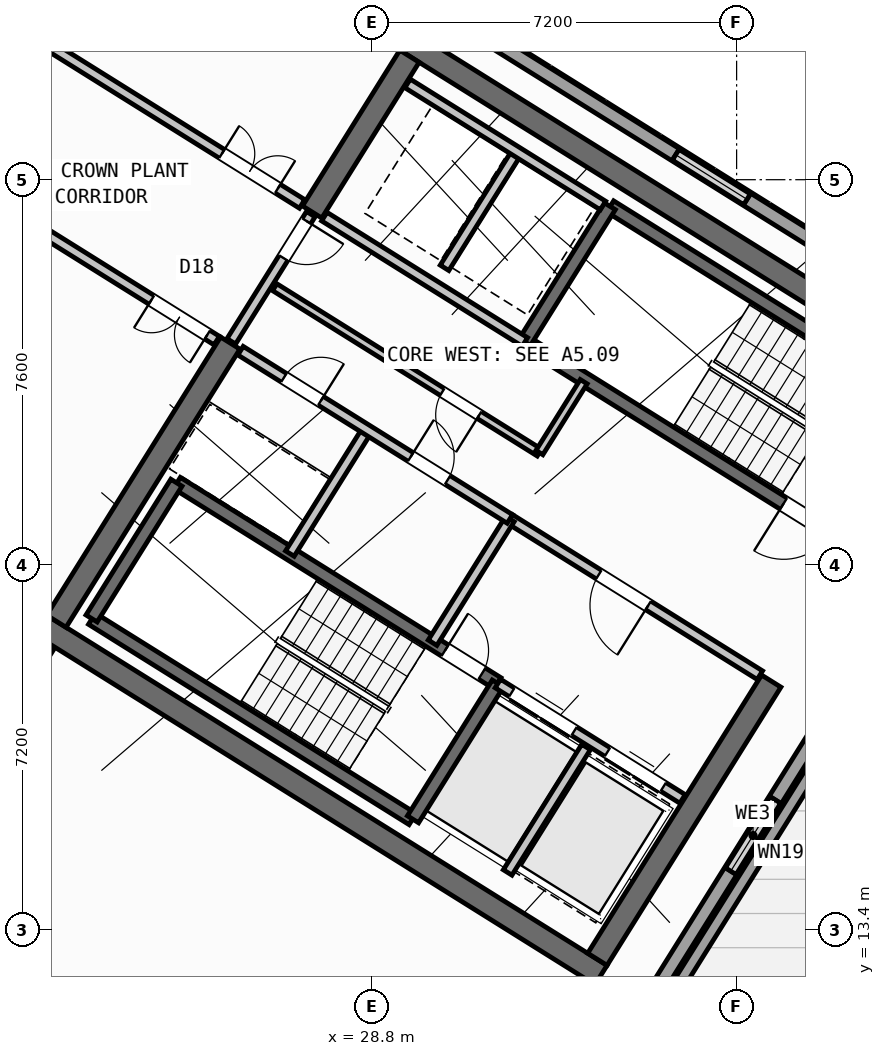
"""IFC4 building model, lengths in metres.
Left out: names, types, materials, properties, quantities, classifications, styles, units other than length and angle.
Written with IfcOpenShell. Run it as: python <this file> out.ifc"""

import sys

from ifc_helpers import new_model, si_unit, direction, frame, frame_2d, origin, origin_2d, place, context, subcontext, project, spatial, rectangle, hollow_rectangle, extrude, source, transform, mapped, element, fill, save


model = new_model("IFC4")
c1 = context("Model", 3, precision=1e-05, world=origin(), true_north=direction((0.0, 1.0)))
c2 = subcontext(c1, "Body", "Model", "MODEL_VIEW")
j1 = project(units=[si_unit("LENGTHUNIT", "METRE"), si_unit("PLANEANGLEUNIT", "RADIAN")], contexts=[c1])
p1 = place(None, origin())
s1 = spatial("IfcSite", under=j1, at=p1, CompositionType="ELEMENT")
p2 = place(p1, origin())
s2 = spatial("IfcBuilding", under=s1, at=p2, CompositionType="ELEMENT")
p3 = place(p2, frame((0.0, 0.0, 298.8)))
s3 = spatial("IfcBuildingStorey", under=s2, at=p3, CompositionType="ELEMENT", Elevation=298.8)
p4 = place(p3, frame((40.531, 24.036, 0.0), z_axis=(0.0, 0.0, 1.0), x_axis=(-0.848048787466, 0.529918157905, 0.0)))
e1 = element("IfcWall", 1, at=p4, inside=s3, PredefinedType="SHEAR", context=c2, shape_type="SweptSolid", body=[
    extrude(rectangle(XDim=13.04, YDim=0.45, at=frame_2d((6.52, 0.0))), origin(), (0.0, 0.0, 1.0), 3.32),
])
p5 = place(p3, frame((33.324, 12.503, 0.0), z_axis=(0.0, 0.0, 1.0), x_axis=(-0.848043529849, 0.529926571782, 0.0)))
e2 = element("IfcWall", 2, at=p5, inside=s3, PredefinedType="SHEAR", context=c2, shape_type="SweptSolid", body=[
    extrude(rectangle(XDim=13.04, YDim=0.45, at=frame_2d((6.52, 0.0))), origin(), (0.0, 0.0, 1.0), 3.32),
])
p6 = place(p3, frame((36.683, 18.304, 0.0), z_axis=(0.0, 0.0, 1.0), x_axis=(-0.529904039071, -0.848057609704, 0.0)))
e3 = element("IfcWall", 3, at=p6, inside=s3, PredefinedType="SHEAR", context=c2, shape_type="SweptSolid", body=[
    extrude(rectangle(XDim=6.475, YDim=0.45, at=frame_2d((3.238, 0.0))), origin(), (0.0, 0.0, 1.0), 3.32),
])
p7 = place(p3, frame((29.544, 30.636, 0.0), z_axis=(0.0, 0.0, 1.0), x_axis=(-0.529902075036, -0.848058836916, 0.0)))
e4 = element("IfcWall", 4, at=p7, inside=s3, PredefinedType="SHEAR", context=c2, shape_type="SweptSolid", body=[
    extrude(rectangle(XDim=3.625, YDim=0.45, at=frame_2d((1.812, 0.0))), origin(), (0.0, 0.0, 1.0), 3.32),
])
p8 = place(p3, frame((26.007, 24.976, 0.0), z_axis=(0.0, 0.0, 1.0), x_axis=(-0.529931155655, -0.848040665456, 0.0)))
e5 = element("IfcWall", 5, at=p8, inside=s3, PredefinedType="SHEAR", context=c2, shape_type="SweptSolid", body=[
    extrude(rectangle(XDim=6.475, YDim=0.45, at=frame_2d((3.238, 0.0))), origin(), (0.0, 0.0, 1.0), 3.32),
])
m1 = source(origin(), c2, "Body", "SweptSolid", [
    extrude(hollow_rectangle(XDim=0.5, YDim=0.5, WallThickness=0.025, at=origin_2d()), origin(), (0.0, 0.0, 1.0), 3.6),
])
p9 = place(p3, frame((22.191, 18.87, 0.0), z_axis=(0.0, 0.0, 1.0), x_axis=(-0.848048096156, 0.529919264233, 0.0)))
e6 = element("IfcColumn", 6, at=p9, inside=s3, PredefinedType="COLUMN", context=c2, shape_type="MappedRepresentation", body=[
    mapped(m1, transform((0.0, 0.0, 0.0), scale=1.0)),
])
p10 = place(p3, frame((31.994, 7.742, 0.0), z_axis=(0.0, 0.0, 1.0), x_axis=(0.529920903963, 0.848047071537, 0.0)))
e7 = element("IfcWall", 7, at=p10, inside=s3, PredefinedType="PARAPET", context=c2, shape_type="SweptSolid", body=[
    extrude(rectangle(XDim=17.436, YDim=0.24, at=frame_2d((8.718, 0.0))), origin(), (0.0, 0.0, 1.0), 1.15),
])
p11 = place(p3, frame((41.182, 23.031, 0.0), z_axis=(0.0, 0.0, 1.0), x_axis=(-0.529915150569, -0.848050666645, 0.0)))
e8 = element("IfcWall", 8, at=p11, inside=s3, PredefinedType="STANDARD", context=c2, shape_type="SweptSolid", body=[
    extrude(rectangle(XDim=18.334, YDim=0.28, at=frame_2d((9.167, 0.0))), origin(), (0.0, 0.0, 1.0), 3.32),
])
p12 = place(p11, frame((8.317, 0.0, 0.85)))
e9 = element("IfcOpeningElement", 9, at=p12, cuts=e8, PredefinedType="OPENING", context=c2, shape_type="SweptSolid", body=[
    extrude(rectangle(XDim=1.7, YDim=1.6, at=frame_2d((0.85, 0.8))), frame((0.0, 0.15, 0.0), z_axis=(0.0, -1.0, 0.0), x_axis=(1.0, 0.0, 0.0)), (0.0, 0.0, 1.0), 0.3),
])
p13 = place(p3, frame((29.512, 7.031, 0.0), z_axis=(0.0, 0.0, 1.0), x_axis=(-0.848049620433, 0.529916824873, 0.0)))
e10 = element("IfcWall", 10, at=p13, inside=s3, PredefinedType="STANDARD", context=c2, shape_type="SweptSolid", body=[
    extrude(rectangle(XDim=22.984, YDim=0.28, at=frame_2d((11.492, 0.0))), origin(), (0.0, 0.0, 1.0), 3.32),
])
p14 = place(p13, frame((8.283, 0.0, 0.85)))
e11 = element("IfcOpeningElement", 11, at=p14, cuts=e10, PredefinedType="OPENING", context=c2, shape_type="SweptSolid", body=[
    extrude(rectangle(XDim=1.7, YDim=1.6, at=frame_2d((0.85, 0.8))), frame((0.0, 0.15, 0.0), z_axis=(0.0, -1.0, 0.0), x_axis=(1.0, 0.0, 0.0)), (0.0, 0.0, 1.0), 0.3),
])
p15 = place(p13, frame((19.875, 0.0, 0.85)))
e12 = element("IfcOpeningElement", 12, at=p15, cuts=e10, PredefinedType="OPENING", context=c2, shape_type="SweptSolid", body=[
    extrude(rectangle(XDim=1.7, YDim=1.6, at=frame_2d((0.85, 0.8))), frame((0.0, 0.15, 0.0), z_axis=(0.0, -1.0, 0.0), x_axis=(1.0, 0.0, 0.0)), (0.0, 0.0, 1.0), 0.3),
])
p16 = place(p3, frame((21.239, 37.164, 0.0), z_axis=(0.0, 0.0, 1.0), x_axis=(0.848046637573, -0.529921598447, 0.0)))
e13 = element("IfcWall", 13, at=p16, inside=s3, PredefinedType="STANDARD", context=c2, shape_type="SweptSolid", body=[
    extrude(rectangle(XDim=22.984, YDim=0.28, at=frame_2d((11.492, 0.0))), origin(), (0.0, 0.0, 1.0), 3.32),
])
p17 = place(p16, frame((4.326, 0.0, 0.85)))
e14 = element("IfcOpeningElement", 14, at=p17, cuts=e13, PredefinedType="OPENING", context=c2, shape_type="SweptSolid", body=[
    extrude(rectangle(XDim=1.7, YDim=1.6, at=frame_2d((0.85, 0.8))), frame((0.0, 0.15, 0.0), z_axis=(0.0, -1.0, 0.0), x_axis=(1.0, 0.0, 0.0)), (0.0, 0.0, 1.0), 0.3),
])
p18 = place(p16, frame((15.968, 0.0, 0.85)))
e15 = element("IfcOpeningElement", 15, at=p18, cuts=e13, PredefinedType="OPENING", context=c2, shape_type="SweptSolid", body=[
    extrude(rectangle(XDim=1.7, YDim=1.6, at=frame_2d((0.85, 0.8))), frame((0.0, 0.15, 0.0), z_axis=(0.0, -1.0, 0.0), x_axis=(1.0, 0.0, 0.0)), (0.0, 0.0, 1.0), 0.3),
])
p19 = place(p3, frame((29.605, 15.581, 0.0), z_axis=(0.0, 0.0, 1.0), x_axis=(-0.848036911448, 0.529937163087, 0.0)))
e16 = element("IfcWall", 16, at=p19, inside=s3, PredefinedType="SHEAR", context=c2, shape_type="SweptSolid", body=[
    extrude(rectangle(XDim=7.46, YDim=0.26, at=frame_2d((3.73, 0.0))), origin(), (0.0, 0.0, 1.0), 3.32),
])
p20 = place(p3, frame((31.28, 18.261, 0.0), z_axis=(0.0, 0.0, 1.0), x_axis=(-0.848051618787, 0.529913626805, 0.0)))
e17 = element("IfcWall", 17, at=p20, inside=s3, PredefinedType="SHEAR", context=c2, shape_type="SweptSolid", body=[
    extrude(rectangle(XDim=7.46, YDim=0.26, at=frame_2d((3.73, 0.0))), origin(), (0.0, 0.0, 1.0), 3.32),
])
p21 = place(p20, frame((0.36, 0.0, 0.0)))
e18 = element("IfcOpeningElement", 18, at=p21, cuts=e17, PredefinedType="OPENING", context=c2, shape_type="SweptSolid", body=[
    extrude(rectangle(XDim=0.86, YDim=2.05, at=frame_2d((0.43, 1.025))), frame((0.0, 0.14, 0.0), z_axis=(0.0, -1.0, 0.0), x_axis=(1.0, 0.0, 0.0)), (0.0, 0.0, 1.0), 0.28),
])
p22 = place(p3, frame((31.288, 18.256, 0.0), z_axis=(0.0, 0.0, 1.0), x_axis=(-0.529943379326, -0.848033026897, 0.0)))
e19 = element("IfcWall", 19, at=p22, inside=s3, PredefinedType="SHEAR", context=c2, shape_type="SweptSolid", body=[
    extrude(rectangle(XDim=3.16, YDim=0.26, at=frame_2d((1.58, 0.0))), origin(), (0.0, 0.0, 1.0), 3.32),
])
p23 = place(p3, frame((24.945, 22.22, 0.0), z_axis=(0.0, 0.0, 1.0), x_axis=(-0.529908658664, -0.84805472316, 0.0)))
e20 = element("IfcWall", 20, at=p23, inside=s3, PredefinedType="SHEAR", context=c2, shape_type="SweptSolid", body=[
    extrude(rectangle(XDim=3.16, YDim=0.26, at=frame_2d((1.58, 0.0))), origin(), (0.0, 0.0, 1.0), 3.32),
])
p24 = place(p3, frame((39.721, 23.788, 0.0), z_axis=(0.0, 0.0, 1.0), x_axis=(-0.848054434086, 0.529909121291, 0.0)))
e21 = element("IfcWall", 21, at=p24, inside=s3, PredefinedType="SHEAR", context=c2, shape_type="SweptSolid", body=[
    extrude(rectangle(XDim=7.33, YDim=0.26, at=frame_2d((3.665, 0.0))), origin(), (0.0, 0.0, 1.0), 3.32),
])
p25 = place(p3, frame((38.046, 21.108, 0.0), z_axis=(0.0, 0.0, 1.0), x_axis=(-0.848054434086, 0.529909121291, 0.0)))
e22 = element("IfcWall", 22, at=p25, inside=s3, PredefinedType="SHEAR", context=c2, shape_type="SweptSolid", body=[
    extrude(rectangle(XDim=7.33, YDim=0.26, at=frame_2d((3.665, 0.0))), origin(), (0.0, 0.0, 1.0), 3.32),
])
p26 = place(p25, frame((0.22, 0.0, 0.0)))
e23 = element("IfcOpeningElement", 23, at=p26, cuts=e22, PredefinedType="OPENING", context=c2, shape_type="SweptSolid", body=[
    extrude(rectangle(XDim=1.1, YDim=2.1, at=frame_2d((0.55, 1.05))), frame((0.0, 0.14, 0.0), z_axis=(0.0, -1.0, 0.0), x_axis=(1.0, 0.0, 0.0)), (0.0, 0.0, 1.0), 0.28),
])
p27 = place(p3, frame((33.496, 27.677, 0.0), z_axis=(0.0, 0.0, 1.0), x_axis=(-0.529908658664, -0.84805472316, 0.0)))
e24 = element("IfcWall", 24, at=p27, inside=s3, PredefinedType="SHEAR", context=c2, shape_type="SweptSolid", body=[
    extrude(rectangle(XDim=3.16, YDim=0.26, at=frame_2d((1.58, 0.0))), origin(), (0.0, 0.0, 1.0), 3.32),
])
p28 = place(p3, frame((34.933, 15.978, 0.0), z_axis=(0.0, 0.0, 1.0), x_axis=(-0.848055739377, 0.529907032327, 0.0)))
e25 = element("IfcWall", 25, at=p28, inside=s3, PredefinedType="STANDARD", context=c2, shape_type="SweptSolid", body=[
    extrude(rectangle(XDim=4.298, YDim=0.2, at=frame_2d((2.149, 0.0))), origin(), (0.0, 0.0, 1.0), 3.31),
])
p29 = place(p28, frame((0.448, 0.0, 0.0)))
e26 = element("IfcOpeningElement", 26, at=p29, cuts=e25, PredefinedType="OPENING", context=c2, shape_type="SweptSolid", body=[
    extrude(rectangle(XDim=1.3, YDim=2.2, at=frame_2d((0.65, 1.1))), frame((0.0, 0.11, 0.0), z_axis=(0.0, -1.0, 0.0), x_axis=(1.0, 0.0, 0.0)), (0.0, 0.0, 1.0), 0.22),
])
p30 = place(p28, frame((2.523, 0.0, 0.0)))
e27 = element("IfcOpeningElement", 27, at=p30, cuts=e25, PredefinedType="OPENING", context=c2, shape_type="SweptSolid", body=[
    extrude(rectangle(XDim=1.45, YDim=2.25, at=frame_2d((0.725, 1.125))), frame((0.0, 0.11, 0.0), z_axis=(0.0, -1.0, 0.0), x_axis=(1.0, 0.0, 0.0)), (0.0, 0.0, 1.0), 0.22),
])
p31 = place(p3, frame((36.459, 18.421, 0.0), z_axis=(0.0, 0.0, 1.0), x_axis=(-0.848059591691, 0.529900867089, 0.0)))
e28 = element("IfcWall", 28, at=p31, inside=s3, PredefinedType="STANDARD", context=c2, shape_type="SweptSolid", body=[
    extrude(rectangle(XDim=5.818, YDim=0.2, at=frame_2d((2.909, 0.0))), origin(), (0.0, 0.0, 1.0), 3.31),
])
p32 = place(p31, frame((2.598, 0.0, 0.0)))
e29 = element("IfcOpeningElement", 29, at=p32, cuts=e28, PredefinedType="OPENING", context=c2, shape_type="SweptSolid", body=[
    extrude(rectangle(XDim=1.15, YDim=2.1, at=frame_2d((0.575, 1.05))), frame((0.0, 0.11, 0.0), z_axis=(0.0, -1.0, 0.0), x_axis=(1.0, 0.0, 0.0)), (0.0, 0.0, 1.0), 0.22),
])
p33 = place(p3, frame((31.822, 24.998, 0.0), z_axis=(0.0, 0.0, 1.0), x_axis=(-0.848054125777, 0.529909614701, 0.0)))
e30 = element("IfcWall", 30, at=p33, inside=s3, PredefinedType="STANDARD", context=c2, shape_type="SweptSolid", body=[
    extrude(rectangle(XDim=4.668, YDim=0.2, at=frame_2d((2.334, 0.0))), origin(), (0.0, 0.0, 1.0), 3.31),
])
p34 = place(p3, frame((32.108, 22.814, 0.0), z_axis=(0.0, 0.0, 1.0), x_axis=(-0.848047283855, 0.529920564185, 0.0)))
e31 = element("IfcWall", 31, at=p34, inside=s3, PredefinedType="PARTITIONING", context=c2, shape_type="SweptSolid", body=[
    extrude(rectangle(XDim=6.16, YDim=0.16, at=frame_2d((3.08, 0.0))), origin(), (0.0, 0.0, 1.0), 3.31),
])
p35 = place(p34, frame((1.4, 0.0, 0.0)))
e32 = element("IfcOpeningElement", 32, at=p35, cuts=e31, PredefinedType="OPENING", context=c2, shape_type="SweptSolid", body=[
    extrude(rectangle(XDim=0.86, YDim=2.05, at=frame_2d((0.43, 1.025))), frame((0.0, 0.09, 0.0), z_axis=(0.0, -1.0, 0.0), x_axis=(1.0, 0.0, 0.0)), (0.0, 0.0, 1.0), 0.18),
])
p36 = place(p3, frame((32.982, 24.213, 0.0), z_axis=(0.0, 0.0, 1.0), x_axis=(-0.529839334948, -0.84809803628, 0.0)))
e33 = element("IfcWall", 33, at=p36, inside=s3, PredefinedType="PARTITIONING", context=c2, shape_type="SweptSolid", body=[
    extrude(rectangle(XDim=1.65, YDim=0.16, at=frame_2d((0.825, 0.0))), origin(), (0.0, 0.0, 1.0), 3.31),
])
p37 = place(p3, frame((33.029, 17.003, 0.0), z_axis=(0.0, 0.0, 1.0), x_axis=(-0.529916267533, -0.848049968695, 0.0)))
e34 = element("IfcWall", 34, at=p37, inside=s3, PredefinedType="STANDARD", context=c2, shape_type="SweptSolid", body=[
    extrude(rectangle(XDim=2.92, YDim=0.2, at=frame_2d((1.46, 0.0))), origin(), (0.0, 0.0, 1.0), 3.31),
])
p38 = place(p3, frame((31.645, 28.716, 0.0), z_axis=(0.0, 0.0, 1.0), x_axis=(-0.52986693015, -0.848080795876, 0.0)))
e35 = element("IfcWall", 35, at=p38, inside=s3, PredefinedType="STANDARD", context=c2, shape_type="SweptSolid", body=[
    extrude(rectangle(XDim=2.66, YDim=0.2, at=frame_2d((1.33, 0.0))), origin(), (0.0, 0.0, 1.0), 3.31),
])
p39 = place(p3, frame((33.363, 27.69, 0.0), z_axis=(0.0, 0.0, 1.0), x_axis=(-0.84804957148, 0.529916903215, 0.0)))
e36 = element("IfcWall", 36, at=p39, inside=s3, PredefinedType="STANDARD", context=c2, shape_type="SweptSolid", body=[
    extrude(rectangle(XDim=4.548, YDim=0.2, at=frame_2d((2.274, 0.0))), origin(), (0.0, 0.0, 1.0), 3.31),
])
for number, where, z_axis, x_axis in (
    (37, (31.525, 21.504, 0.0), (0.0, 0.0, 1.0), (-0.53, -0.848, 0.0)),
    (38, (28.71, 23.263, 0.0), (0.0, 0.0, 1.0), (-0.53, -0.848, 0.0)),
):
    element("IfcWall", number, at=place(p3, frame(where, z_axis=z_axis, x_axis=x_axis)), inside=s3, PredefinedType="STANDARD", context=c2, shape_type="SweptSolid", body=[
        extrude(rectangle(XDim=2.88, YDim=0.2, at=frame_2d((1.44, 0.0))), origin(), (0.0, 0.0, 1.0), 3.31),
    ])
p40 = place(p3, frame((31.525, 21.504, 0.0), z_axis=(0.0, 0.0, 1.0), x_axis=(-0.848042066329, 0.529928913853, 0.0)))
e39 = element("IfcWall", 39, at=p40, inside=s3, PredefinedType="STANDARD", context=c2, shape_type="SweptSolid", body=[
    extrude(rectangle(XDim=6.268, YDim=0.2, at=frame_2d((3.134, 0.0))), origin(), (0.0, 0.0, 1.0), 3.31),
])
p41 = place(p40, frame((4.4, 0.0, 0.0)))
e40 = element("IfcOpeningElement", 40, at=p41, cuts=e39, PredefinedType="OPENING", context=c2, shape_type="SweptSolid", body=[
    extrude(rectangle(XDim=0.86, YDim=2.05, at=frame_2d((0.43, 1.025))), frame((0.0, 0.11, 0.0), z_axis=(0.0, -1.0, 0.0), x_axis=(1.0, 0.0, 0.0)), (0.0, 0.0, 1.0), 0.22),
])
p42 = place(p40, frame((1.45, 0.0, 0.0)))
e41 = element("IfcOpeningElement", 41, at=p42, cuts=e39, PredefinedType="OPENING", context=c2, shape_type="SweptSolid", body=[
    extrude(rectangle(XDim=0.86, YDim=2.05, at=frame_2d((0.43, 1.025))), frame((0.0, 0.11, 0.0), z_axis=(0.0, -1.0, 0.0), x_axis=(1.0, 0.0, 0.0)), (0.0, 0.0, 1.0), 0.22),
])
p43 = place(p3, frame((27.596, 27.52, 0.0), z_axis=(0.0, 0.0, 1.0), x_axis=(-0.529865479138, -0.848081702443, 0.0)))
e42 = element("IfcWall", 42, at=p43, inside=s3, PredefinedType="STANDARD", context=c2, shape_type="SweptSolid", body=[
    extrude(rectangle(XDim=2.96, YDim=0.2, at=frame_2d((1.48, 0.0))), origin(), (0.0, 0.0, 1.0), 3.31),
])
p44 = place(p43, frame((0.16, 0.0, 0.0)))
e43 = element("IfcOpeningElement", 43, at=p44, cuts=e42, PredefinedType="OPENING", context=c2, shape_type="SweptSolid", body=[
    extrude(rectangle(XDim=0.86, YDim=2.05, at=frame_2d((0.43, 1.025))), frame((0.0, 0.11, 0.0), z_axis=(0.0, -1.0, 0.0), x_axis=(1.0, 0.0, 0.0)), (0.0, 0.0, 1.0), 0.22),
])
p45 = place(p3, frame((25.74, 25.025, 0.0), z_axis=(0.0, 0.0, 1.0), x_axis=(-0.848049978884, 0.529916251227, 0.0)))
e44 = element("IfcWall", 44, at=p45, inside=s3, PredefinedType="STANDARD", context=c2, shape_type="SweptSolid", body=[
    extrude(rectangle(XDim=11.678, YDim=0.2, at=frame_2d((5.839, 0.0))), origin(), (0.0, 0.0, 1.0), 3.31),
])
p46 = place(p45, frame((0.218, 0.0, 0.0)))
e45 = element("IfcOpeningElement", 45, at=p46, cuts=e44, PredefinedType="OPENING", context=c2, shape_type="SweptSolid", body=[
    extrude(rectangle(XDim=1.3, YDim=2.15, at=frame_2d((0.65, 1.075))), frame((0.0, 0.11, 0.0), z_axis=(0.0, -1.0, 0.0), x_axis=(1.0, 0.0, 0.0)), (0.0, 0.0, 1.0), 0.22),
])
p47 = place(p45, frame((6.003, 0.0, 0.0)))
e46 = element("IfcOpeningElement", 46, at=p47, cuts=e44, PredefinedType="OPENING", context=c2, shape_type="SweptSolid", body=[
    extrude(rectangle(XDim=1.3, YDim=2.15, at=frame_2d((0.65, 1.075))), frame((0.0, 0.11, 0.0), z_axis=(0.0, -1.0, 0.0), x_axis=(1.0, 0.0, 0.0)), (0.0, 0.0, 1.0), 0.22),
])
p48 = place(p3, frame((27.425, 27.721, 0.0), z_axis=(0.0, 0.0, 1.0), x_axis=(-0.848055849499, 0.529906856089, 0.0)))
e47 = element("IfcWall", 47, at=p48, inside=s3, PredefinedType="STANDARD", context=c2, shape_type="SweptSolid", body=[
    extrude(rectangle(XDim=11.678, YDim=0.2, at=frame_2d((5.839, 0.0))), origin(), (0.0, 0.0, 1.0), 3.31),
])
p49 = place(p48, frame((0.568, 0.0, 0.0)))
e48 = element("IfcOpeningElement", 48, at=p49, cuts=e47, PredefinedType="OPENING", context=c2, shape_type="SweptSolid", body=[
    extrude(rectangle(XDim=1.3, YDim=2.15, at=frame_2d((0.65, 1.075))), frame((0.0, 0.11, 0.0), z_axis=(0.0, -1.0, 0.0), x_axis=(1.0, 0.0, 0.0)), (0.0, 0.0, 1.0), 0.22),
])
m2 = source(origin(), c2, "Body", "SweptSolid", [
    extrude(rectangle(XDim=1.7, YDim=1.6, at=frame_2d((0.85, 0.8))), frame((0.0, 0.03, 0.0), z_axis=(0.0, -1.0, 0.0), x_axis=(1.0, 0.0, 0.0)), (0.0, 0.0, 1.0), 0.06),
])
p50 = place(p12, origin())
e49 = element("IfcWindow", 49, at=p50, inside=s3, PartitioningType="SINGLE_PANEL", PredefinedType="WINDOW", context=c2, shape_type="MappedRepresentation", body=[
    mapped(m2, transform((0.0, 0.0, 0.0), scale=1.0)),
])
fill(e9, e49)
p51 = place(p18, origin())
e50 = element("IfcWindow", 50, at=p51, inside=s3, PartitioningType="SINGLE_PANEL", PredefinedType="WINDOW", context=c2, shape_type="MappedRepresentation", body=[
    mapped(m2, transform((0.0, 0.0, 0.0), scale=1.0)),
])
fill(e15, e50)
m3 = source(origin(), c2, "Body", "SweptSolid", [
    extrude(rectangle(XDim=0.86, YDim=2.05, at=frame_2d((0.43, 1.025))), frame((0.0, 0.025, 0.0), z_axis=(0.0, -1.0, 0.0), x_axis=(1.0, 0.0, 0.0)), (0.0, 0.0, 1.0), 0.05),
])
p52 = place(p21, frame((0.86, 0.0, 0.0), z_axis=(0.0, 0.0, 1.0), x_axis=(-1.0, 0.0, 0.0)))
e51 = element("IfcDoor", 51, at=p52, inside=s3, OperationType="SINGLE_SWING_LEFT", PredefinedType="DOOR", context=c2, shape_type="MappedRepresentation", body=[
    mapped(m3, transform((0.0, 0.0, 0.0), scale=1.0)),
])
fill(e18, e51)
p53 = place(p35, origin())
e52 = element("IfcDoor", 52, at=p53, inside=s3, OperationType="SINGLE_SWING_LEFT", PredefinedType="DOOR", context=c2, shape_type="MappedRepresentation", body=[
    mapped(m3, transform((0.0, 0.0, 0.0), scale=1.0)),
])
fill(e32, e52)
m4 = source(origin(), c2, "Body", "SweptSolid", [
    extrude(rectangle(XDim=1.1, YDim=2.1, at=frame_2d((0.55, 1.05))), frame((0.0, 0.025, 0.0), z_axis=(0.0, -1.0, 0.0), x_axis=(1.0, 0.0, 0.0)), (0.0, 0.0, 1.0), 0.05),
])
p54 = place(p26, origin())
e53 = element("IfcDoor", 53, at=p54, inside=s3, OperationType="SINGLE_SWING_RIGHT", PredefinedType="DOOR", context=c2, shape_type="MappedRepresentation", body=[
    mapped(m4, transform((0.0, 0.0, 0.0), scale=1.0)),
])
fill(e23, e53)
m5 = source(origin(), c2, "Body", "SweptSolid", [
    extrude(rectangle(XDim=1.15, YDim=2.1, at=frame_2d((0.575, 1.05))), frame((0.0, 0.025, 0.0), z_axis=(0.0, -1.0, 0.0), x_axis=(1.0, 0.0, 0.0)), (0.0, 0.0, 1.0), 0.05),
])
p55 = place(p32, origin())
e54 = element("IfcDoor", 54, at=p55, inside=s3, OperationType="SINGLE_SWING_LEFT", PredefinedType="DOOR", context=c2, shape_type="MappedRepresentation", body=[
    mapped(m5, transform((0.0, 0.0, 0.0), scale=1.0)),
])
fill(e29, e54)
m6 = source(origin(), c2, "Body", "SweptSolid", [
    extrude(rectangle(XDim=1.3, YDim=2.2, at=frame_2d((0.65, 1.1))), frame((0.0, 0.025, 0.0), z_axis=(0.0, -1.0, 0.0), x_axis=(1.0, 0.0, 0.0)), (0.0, 0.0, 1.0), 0.05),
])
p56 = place(p29, origin())
e55 = element("IfcDoor", 55, at=p56, inside=s3, OperationType="DOUBLE_DOOR_SLIDING", PredefinedType="DOOR", context=c2, shape_type="MappedRepresentation", body=[
    mapped(m6, transform((0.0, 0.0, 0.0), scale=1.0)),
])
fill(e26, e55)
m7 = source(origin(), c2, "Body", "SweptSolid", [
    extrude(rectangle(XDim=1.45, YDim=2.25, at=frame_2d((0.725, 1.125))), frame((0.0, 0.025, 0.0), z_axis=(0.0, -1.0, 0.0), x_axis=(1.0, 0.0, 0.0)), (0.0, 0.0, 1.0), 0.05),
])
p57 = place(p30, origin())
e56 = element("IfcDoor", 56, at=p57, inside=s3, OperationType="DOUBLE_DOOR_SLIDING", PredefinedType="DOOR", context=c2, shape_type="MappedRepresentation", body=[
    mapped(m7, transform((0.0, 0.0, 0.0), scale=1.0)),
])
fill(e27, e56)
p58 = place(p41, frame((0.86, 0.0, 0.0), z_axis=(0.0, 0.0, 1.0), x_axis=(-1.0, 0.0, 0.0)))
e57 = element("IfcDoor", 57, at=p58, inside=s3, OperationType="SINGLE_SWING_RIGHT", PredefinedType="DOOR", context=c2, shape_type="MappedRepresentation", body=[
    mapped(m3, transform((0.0, 0.0, 0.0), scale=1.0)),
])
fill(e40, e57)
p59 = place(p42, frame((0.86, 0.0, 0.0), z_axis=(0.0, 0.0, 1.0), x_axis=(-1.0, 0.0, 0.0)))
e58 = element("IfcDoor", 58, at=p59, inside=s3, OperationType="SINGLE_SWING_LEFT", PredefinedType="DOOR", context=c2, shape_type="MappedRepresentation", body=[
    mapped(m3, transform((0.0, 0.0, 0.0), scale=1.0)),
])
fill(e41, e58)
p60 = place(p44, origin())
e59 = element("IfcDoor", 59, at=p60, inside=s3, OperationType="SINGLE_SWING_LEFT", PredefinedType="DOOR", context=c2, shape_type="MappedRepresentation", body=[
    mapped(m3, transform((0.0, 0.0, 0.0), scale=1.0)),
])
fill(e43, e59)
m8 = source(origin(), c2, "Body", "SweptSolid", [
    extrude(rectangle(XDim=1.3, YDim=2.15, at=frame_2d((0.65, 1.075))), frame((0.0, 0.025, 0.0), z_axis=(0.0, -1.0, 0.0), x_axis=(1.0, 0.0, 0.0)), (0.0, 0.0, 1.0), 0.05),
])
p61 = place(p46, origin())
e60 = element("IfcDoor", 60, at=p61, inside=s3, OperationType="DOUBLE_DOOR_SINGLE_SWING", PredefinedType="DOOR", context=c2, shape_type="MappedRepresentation", body=[
    mapped(m8, transform((0.0, 0.0, 0.0), scale=1.0)),
])
fill(e45, e60)
p62 = place(p49, frame((1.3, 0.0, 0.0), z_axis=(0.0, 0.0, 1.0), x_axis=(-1.0, 0.0, 0.0)))
e61 = element("IfcDoor", 61, at=p62, inside=s3, OperationType="DOUBLE_DOOR_SINGLE_SWING", PredefinedType="DOOR", context=c2, shape_type="MappedRepresentation", body=[
    mapped(m8, transform((0.0, 0.0, 0.0), scale=1.0)),
])
fill(e48, e61)
save(model, sys.argv[1])
